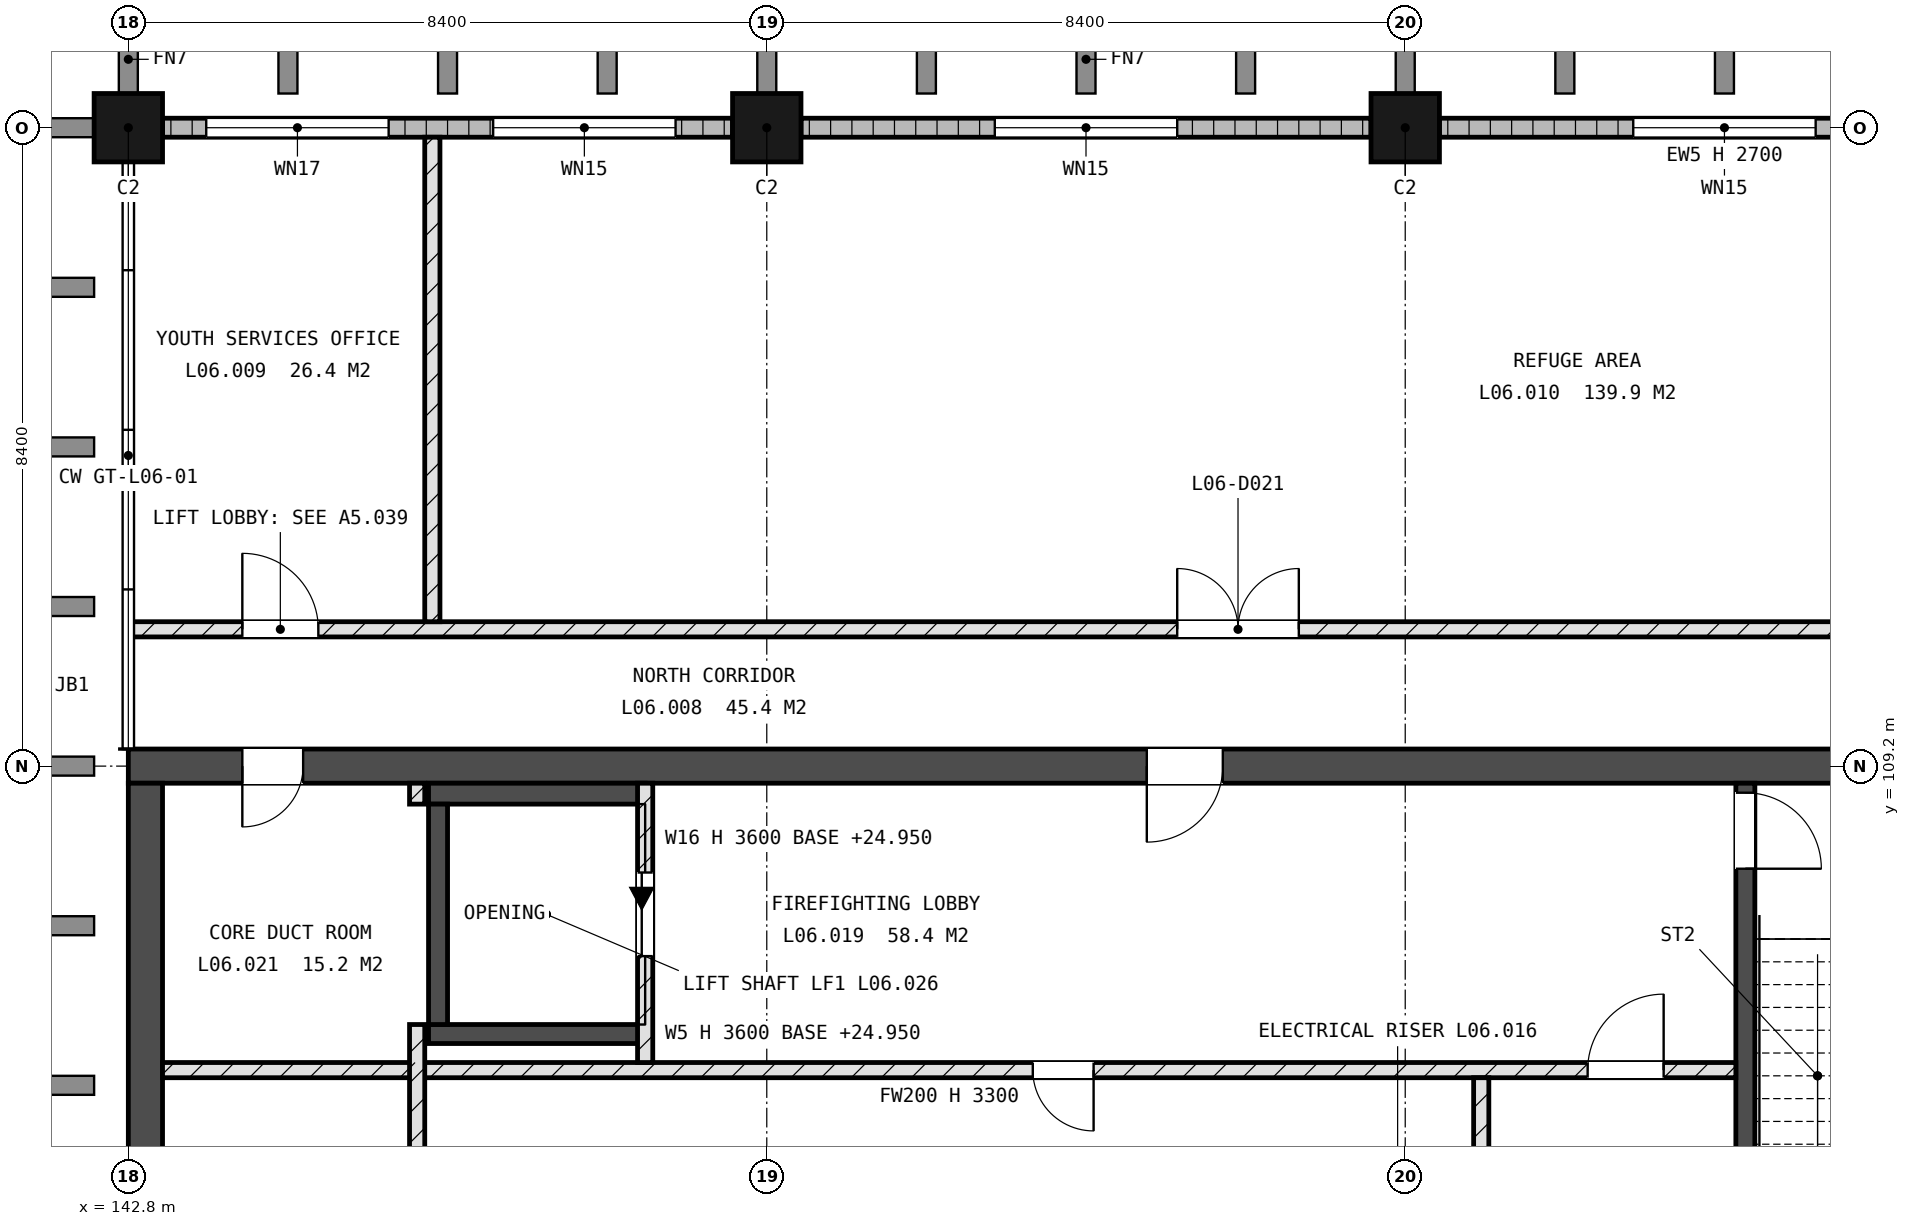
"""IFC4 building model, lengths in metres.
Left out: names, types, materials, properties, quantities, classifications, styles, units other than length and angle.
Written with IfcOpenShell. Run it as: python <this file> out.ifc"""

import sys

from ifc_helpers import new_model, si_unit, direction, frame, frame_2d, origin, origin_2d, place, context, subcontext, project, spatial, rectangle, extrude, element, fill, save


model = new_model("IFC4")
c1 = context("Model", 3, precision=1e-05, world=origin(), true_north=direction((0.0, 1.0)))
c2 = subcontext(c1, "Body", "Model", "MODEL_VIEW")
j1 = project(units=[si_unit("LENGTHUNIT", "METRE"), si_unit("PLANEANGLEUNIT", "RADIAN")], contexts=[c1])
p1 = place(None, origin())
s1 = spatial("IfcSite", under=j1, at=p1, CompositionType="ELEMENT")
p2 = place(p1, origin())
s2 = spatial("IfcBuilding", under=s1, at=p2, CompositionType="ELEMENT")
p3 = place(p2, frame((0.0, 0.0, 25.2)))
s3 = spatial("IfcBuildingStorey", under=s2, at=p3, CompositionType="ELEMENT", Elevation=25.2)
for number, where, z_axis, x_axis in (
    (1, (142.8, 117.6, -0.25), (0.0, 0.0, 1.0), (1.0, 0.0, 0.0)),
    (2, (151.2, 117.6, -0.25), (0.0, 0.0, 1.0), (1.0, 0.0, 0.0)),
    (3, (159.6, 117.6, -0.25), (0.0, 0.0, 1.0), (1.0, 0.0, 0.0)),
):
    element("IfcColumn", number, at=place(p3, frame(where, z_axis=z_axis, x_axis=x_axis)), inside=s3, PredefinedType="COLUMN", context=c2, shape_type="SweptSolid", body=[
        extrude(rectangle(XDim=0.9, YDim=0.9, at=origin_2d()), origin(), (0.0, 0.0, 1.0), 3.6),
    ])
p4 = place(p3, frame((142.8, 109.2, -0.25), z_axis=(0.0, 0.0, 1.0), x_axis=(1.0, 0.0, 0.0)))
e4 = element("IfcWall", 4, at=p4, inside=s3, PredefinedType="SHEAR", context=c2, shape_type="SweptSolid", body=[
    extrude(rectangle(XDim=25.2, YDim=0.45, at=frame_2d((12.6, 0.0))), origin(), (0.0, 0.0, 1.0), 3.6),
])
p5 = place(p4, frame((22.8, 0.0, 0.25)))
e5 = element("IfcOpeningElement", 5, at=p5, cuts=e4, PredefinedType="OPENING", context=c2, shape_type="SweptSolid", body=[
    extrude(rectangle(XDim=1.0, YDim=2.1, at=frame_2d((0.5, 1.05))), frame((0.0, 0.235, 0.0), z_axis=(0.0, -1.0, 0.0), x_axis=(1.0, 0.0, 0.0)), (0.0, 0.0, 1.0), 0.47),
])
p6 = place(p4, frame((1.5, 0.0, 0.25)))
e6 = element("IfcOpeningElement", 6, at=p6, cuts=e4, PredefinedType="OPENING", context=c2, shape_type="SweptSolid", body=[
    extrude(rectangle(XDim=0.8, YDim=2.1, at=frame_2d((0.4, 1.05))), frame((0.0, 0.235, 0.0), z_axis=(0.0, -1.0, 0.0), x_axis=(1.0, 0.0, 0.0)), (0.0, 0.0, 1.0), 0.47),
])
p7 = place(p4, frame((13.4, 0.0, 0.25)))
e7 = element("IfcOpeningElement", 7, at=p7, cuts=e4, PredefinedType="OPENING", context=c2, shape_type="SweptSolid", body=[
    extrude(rectangle(XDim=1.0, YDim=2.1, at=frame_2d((0.5, 1.05))), frame((0.0, 0.235, 0.0), z_axis=(0.0, -1.0, 0.0), x_axis=(1.0, 0.0, 0.0)), (0.0, 0.0, 1.0), 0.47),
])
p8 = place(p3, frame((143.025, 92.625, -0.25), z_axis=(0.0, 0.0, 1.0), x_axis=(0.0, 1.0, 0.0)))
e8 = element("IfcWall", 8, at=p8, inside=s3, PredefinedType="SHEAR", context=c2, shape_type="SweptSolid", body=[
    extrude(rectangle(XDim=16.35, YDim=0.45, at=frame_2d((8.175, 0.0))), origin(), (0.0, 0.0, 1.0), 3.6),
])
p9 = place(p8, frame((2.975, 0.0, 1.85)))
e9 = element("IfcOpeningElement", 9, at=p9, cuts=e8, PredefinedType="OPENING", context=c2, shape_type="SweptSolid", body=[
    extrude(rectangle(XDim=1.2, YDim=0.9, at=frame_2d((0.6, 0.45))), frame((0.0, 0.235, 0.0), z_axis=(0.0, -1.0, 0.0), x_axis=(1.0, 0.0, 0.0)), (0.0, 0.0, 1.0), 0.47),
])
p10 = place(p3, frame((164.075, 101.35, -0.25), z_axis=(0.0, 0.0, 1.0), x_axis=(0.0, 1.0, 0.0)))
e10 = element("IfcWall", 10, at=p10, inside=s3, PredefinedType="SHEAR", context=c2, shape_type="SweptSolid", body=[
    extrude(rectangle(XDim=7.625, YDim=0.25, at=frame_2d((3.812, 0.0))), origin(), (0.0, 0.0, 1.0), 3.6),
])
p11 = place(p10, frame((6.5, 0.0, 0.25)))
e11 = element("IfcOpeningElement", 11, at=p11, cuts=e10, PredefinedType="OPENING", context=c2, shape_type="SweptSolid", body=[
    extrude(rectangle(XDim=1.0, YDim=2.1, at=frame_2d((0.5, 1.05))), frame((0.0, 0.135, 0.0), z_axis=(0.0, -1.0, 0.0), x_axis=(1.0, 0.0, 0.0)), (0.0, 0.0, 1.0), 0.27),
])
p12 = place(p3, frame((146.75, 105.675, -0.25), z_axis=(0.0, 0.0, 1.0), x_axis=(1.0, 0.0, 0.0)))
e12 = element("IfcWall", 12, at=p12, inside=s3, PredefinedType="SHEAR", context=c2, shape_type="SweptSolid", body=[
    extrude(rectangle(XDim=2.85, YDim=0.25, at=frame_2d((1.425, 0.0))), origin(), (0.0, 0.0, 1.0), 3.6),
])
p13 = place(p3, frame((146.75, 108.837, -0.25), z_axis=(0.0, 0.0, 1.0), x_axis=(1.0, 0.0, 0.0)))
e13 = element("IfcWall", 13, at=p13, inside=s3, PredefinedType="SHEAR", context=c2, shape_type="SweptSolid", body=[
    extrude(rectangle(XDim=2.85, YDim=0.275, at=frame_2d((1.425, 0.0))), origin(), (0.0, 0.0, 1.0), 3.6),
])
p14 = place(p3, frame((146.875, 105.8, -0.25), z_axis=(0.0, 0.0, 1.0), x_axis=(0.0, 1.0, 0.0)))
e14 = element("IfcWall", 14, at=p14, inside=s3, PredefinedType="SHEAR", context=c2, shape_type="SweptSolid", body=[
    extrude(rectangle(XDim=2.9, YDim=0.25, at=frame_2d((1.45, 0.0))), origin(), (0.0, 0.0, 1.0), 3.6),
])
p15 = place(p3, frame((143.25, 117.6, 0.0), z_axis=(0.0, 0.0, 1.0), x_axis=(1.0, 0.0, 0.0)))
e15 = element("IfcWall", 15, at=p15, inside=s3, PredefinedType="STANDARD", context=c2, shape_type="SweptSolid", body=[
    extrude(rectangle(XDim=7.5, YDim=0.25, at=frame_2d((3.75, 0.0))), origin(), (0.0, 0.0, 1.0), 2.7),
])
p16 = place(p15, frame((0.575, 0.0, 0.9)))
e16 = element("IfcOpeningElement", 16, at=p16, cuts=e15, PredefinedType="OPENING", context=c2, shape_type="SweptSolid", body=[
    extrude(rectangle(XDim=2.4, YDim=1.5, at=frame_2d((1.2, 0.75))), frame((0.0, 0.135, 0.0), z_axis=(0.0, -1.0, 0.0), x_axis=(1.0, 0.0, 0.0)), (0.0, 0.0, 1.0), 0.27),
])
p17 = place(p15, frame((4.35, 0.0, 0.9)))
e17 = element("IfcOpeningElement", 17, at=p17, cuts=e15, PredefinedType="OPENING", context=c2, shape_type="SweptSolid", body=[
    extrude(rectangle(XDim=2.4, YDim=1.5, at=frame_2d((1.2, 0.75))), frame((0.0, 0.135, 0.0), z_axis=(0.0, -1.0, 0.0), x_axis=(1.0, 0.0, 0.0)), (0.0, 0.0, 1.0), 0.27),
])
p18 = place(p3, frame((151.65, 117.6, 0.0), z_axis=(0.0, 0.0, 1.0), x_axis=(1.0, 0.0, 0.0)))
e18 = element("IfcWall", 18, at=p18, inside=s3, PredefinedType="STANDARD", context=c2, shape_type="SweptSolid", body=[
    extrude(rectangle(XDim=7.5, YDim=0.25, at=frame_2d((3.75, 0.0))), origin(), (0.0, 0.0, 1.0), 2.7),
])
p19 = place(p18, frame((2.55, 0.0, 0.9)))
e19 = element("IfcOpeningElement", 19, at=p19, cuts=e18, PredefinedType="OPENING", context=c2, shape_type="SweptSolid", body=[
    extrude(rectangle(XDim=2.4, YDim=1.5, at=frame_2d((1.2, 0.75))), frame((0.0, 0.135, 0.0), z_axis=(0.0, -1.0, 0.0), x_axis=(1.0, 0.0, 0.0)), (0.0, 0.0, 1.0), 0.27),
])
p20 = place(p3, frame((160.05, 117.6, 0.0), z_axis=(0.0, 0.0, 1.0), x_axis=(1.0, 0.0, 0.0)))
e20 = element("IfcWall", 20, at=p20, inside=s3, PredefinedType="STANDARD", context=c2, shape_type="SweptSolid", body=[
    extrude(rectangle(XDim=7.5, YDim=0.25, at=frame_2d((3.75, 0.0))), origin(), (0.0, 0.0, 1.0), 2.7),
])
p21 = place(p20, frame((2.55, 0.0, 0.9)))
e21 = element("IfcOpeningElement", 21, at=p21, cuts=e20, PredefinedType="OPENING", context=c2, shape_type="SweptSolid", body=[
    extrude(rectangle(XDim=2.4, YDim=1.5, at=frame_2d((1.2, 0.75))), frame((0.0, 0.135, 0.0), z_axis=(0.0, -1.0, 0.0), x_axis=(1.0, 0.0, 0.0)), (0.0, 0.0, 1.0), 0.27),
])
p22 = place(p3, frame((143.25, 105.2, 0.0), z_axis=(0.0, 0.0, 1.0), x_axis=(1.0, 0.0, 0.0)))
e22 = element("IfcWall", 22, at=p22, inside=s3, PredefinedType="SOLIDWALL", context=c2, shape_type="SweptSolid", body=[
    extrude(rectangle(XDim=20.7, YDim=0.2, at=frame_2d((10.35, 0.0))), origin(), (0.0, 0.0, 1.0), 3.3),
])
p23 = place(p22, frame((11.45, 0.0, 0.0)))
e23 = element("IfcOpeningElement", 23, at=p23, cuts=e22, PredefinedType="OPENING", context=c2, shape_type="SweptSolid", body=[
    extrude(rectangle(XDim=0.8, YDim=2.1, at=frame_2d((0.4, 1.05))), frame((0.0, 0.11, 0.0), z_axis=(0.0, -1.0, 0.0), x_axis=(1.0, 0.0, 0.0)), (0.0, 0.0, 1.0), 0.22),
])
p24 = place(p22, frame((18.75, 0.0, 0.0)))
e24 = element("IfcOpeningElement", 24, at=p24, cuts=e22, PredefinedType="OPENING", context=c2, shape_type="SweptSolid", body=[
    extrude(rectangle(XDim=1.0, YDim=2.1, at=frame_2d((0.5, 1.05))), frame((0.0, 0.11, 0.0), z_axis=(0.0, -1.0, 0.0), x_axis=(1.0, 0.0, 0.0)), (0.0, 0.0, 1.0), 0.22),
])
p25 = place(p3, frame((142.8, 111.0, 0.0), z_axis=(0.0, 0.0, 1.0), x_axis=(1.0, 0.0, 0.0)))
e25 = element("IfcWall", 25, at=p25, inside=s3, PredefinedType="SOLIDWALL", context=c2, shape_type="SweptSolid", body=[
    extrude(rectangle(XDim=25.075, YDim=0.2, at=frame_2d((12.538, 0.0))), origin(), (0.0, 0.0, 1.0), 3.3),
])
p26 = place(p25, frame((1.5, 0.0, 0.0)))
e26 = element("IfcOpeningElement", 26, at=p26, cuts=e25, PredefinedType="OPENING", context=c2, shape_type="SweptSolid", body=[
    extrude(rectangle(XDim=1.0, YDim=2.1, at=frame_2d((0.5, 1.05))), frame((0.0, 0.11, 0.0), z_axis=(0.0, -1.0, 0.0), x_axis=(1.0, 0.0, 0.0)), (0.0, 0.0, 1.0), 0.22),
])
p27 = place(p25, frame((13.8, 0.0, 0.0)))
e27 = element("IfcOpeningElement", 27, at=p27, cuts=e25, PredefinedType="OPENING", context=c2, shape_type="SweptSolid", body=[
    extrude(rectangle(XDim=1.6, YDim=2.25, at=frame_2d((0.8, 1.125))), frame((0.0, 0.11, 0.0), z_axis=(0.0, -1.0, 0.0), x_axis=(1.0, 0.0, 0.0)), (0.0, 0.0, 1.0), 0.22),
])
p28 = place(p3, frame((146.6, 100.5, 0.0), z_axis=(0.0, 0.0, 1.0), x_axis=(0.0, 1.0, 0.0)))
e28 = element("IfcWall", 28, at=p28, inside=s3, PredefinedType="SOLIDWALL", context=c2, shape_type="SweptSolid", body=[
    extrude(rectangle(XDim=5.3, YDim=0.2, at=frame_2d((2.65, 0.0))), origin(), (0.0, 0.0, 1.0), 3.3),
])
p29 = place(p28, frame((1.8, 0.0, 0.0)))
e29 = element("IfcOpeningElement", 29, at=p29, cuts=e28, PredefinedType="OPENING", context=c2, shape_type="SweptSolid", body=[
    extrude(rectangle(XDim=1.0, YDim=2.1, at=frame_2d((0.5, 1.05))), frame((0.0, 0.11, 0.0), z_axis=(0.0, -1.0, 0.0), x_axis=(1.0, 0.0, 0.0)), (0.0, 0.0, 1.0), 0.22),
])
p30 = place(p3, frame((146.6, 108.7, 0.0), z_axis=(0.0, 0.0, 1.0), x_axis=(0.0, 1.0, 0.0)))
e30 = element("IfcWall", 30, at=p30, inside=s3, PredefinedType="SOLIDWALL", context=c2, shape_type="SweptSolid", body=[
    extrude(rectangle(XDim=0.275, YDim=0.2, at=frame_2d((0.138, 0.0))), origin(), (0.0, 0.0, 1.0), 3.3),
])
p31 = place(p3, frame((146.8, 111.1, 0.0), z_axis=(0.0, 0.0, 1.0), x_axis=(0.0, 1.0, 0.0)))
e31 = element("IfcWall", 31, at=p31, inside=s3, PredefinedType="SOLIDWALL", context=c2, shape_type="SweptSolid", body=[
    extrude(rectangle(XDim=6.375, YDim=0.2, at=frame_2d((3.188, 0.0))), origin(), (0.0, 0.0, 1.0), 3.3),
])
p32 = place(p3, frame((149.6, 105.3, 0.0), z_axis=(0.0, 0.0, 1.0), x_axis=(0.0, 1.0, 0.0)))
e32 = element("IfcWall", 32, at=p32, inside=s3, PredefinedType="SOLIDWALL", context=c2, shape_type="SweptSolid", body=[
    extrude(rectangle(XDim=3.675, YDim=0.2, at=frame_2d((1.837, 0.0))), origin(), (0.0, 0.0, 1.0), 3.3),
])
p33 = place(p32, frame((1.4, 0.0, 0.0)))
e33 = element("IfcOpeningElement", 33, at=p33, cuts=e32, PredefinedType="OPENING", context=c2, shape_type="SweptSolid", body=[
    extrude(rectangle(XDim=1.1, YDim=2.1, at=frame_2d((0.55, 1.05))), frame((0.0, 0.11, 0.0), z_axis=(0.0, -1.0, 0.0), x_axis=(1.0, 0.0, 0.0)), (0.0, 0.0, 1.0), 0.22),
])
p34 = place(p3, frame((160.6, 92.625, 0.0), z_axis=(0.0, 0.0, 1.0), x_axis=(0.0, 1.0, 0.0)))
e34 = element("IfcWall", 34, at=p34, inside=s3, PredefinedType="SOLIDWALL", context=c2, shape_type="SweptSolid", body=[
    extrude(rectangle(XDim=12.475, YDim=0.2, at=frame_2d((6.238, 0.0))), origin(), (0.0, 0.0, 1.0), 3.3),
])
p35 = place(p34, frame((5.075, 0.0, 0.0)))
e35 = element("IfcOpeningElement", 35, at=p35, cuts=e34, PredefinedType="OPENING", context=c2, shape_type="SweptSolid", body=[
    extrude(rectangle(XDim=0.8, YDim=2.1, at=frame_2d((0.4, 1.05))), frame((0.0, 0.11, 0.0), z_axis=(0.0, -1.0, 0.0), x_axis=(1.0, 0.0, 0.0)), (0.0, 0.0, 1.0), 0.22),
])
p36 = place(p34, frame((0.775, 0.0, 0.0)))
e36 = element("IfcOpeningElement", 36, at=p36, cuts=e34, PredefinedType="OPENING", context=c2, shape_type="SweptSolid", body=[
    extrude(rectangle(XDim=1.0, YDim=2.1, at=frame_2d((0.5, 1.05))), frame((0.0, 0.11, 0.0), z_axis=(0.0, -1.0, 0.0), x_axis=(1.0, 0.0, 0.0)), (0.0, 0.0, 1.0), 0.22),
])
p37 = place(p16, origin())
e37 = element("IfcWindow", 37, at=p37, inside=s3, PartitioningType="SINGLE_PANEL", PredefinedType="WINDOW", context=c2, shape_type="SweptSolid", body=[
    extrude(rectangle(XDim=2.4, YDim=1.5, at=frame_2d((1.2, 0.75))), frame((0.0, 0.03, 0.0), z_axis=(0.0, -1.0, 0.0), x_axis=(1.0, 0.0, 0.0)), (0.0, 0.0, 1.0), 0.06),
])
fill(e16, e37)
p38 = place(p17, origin())
e38 = element("IfcWindow", 38, at=p38, inside=s3, PartitioningType="SINGLE_PANEL", PredefinedType="WINDOW", context=c2, shape_type="SweptSolid", body=[
    extrude(rectangle(XDim=2.4, YDim=1.5, at=frame_2d((1.2, 0.75))), frame((0.0, 0.03, 0.0), z_axis=(0.0, -1.0, 0.0), x_axis=(1.0, 0.0, 0.0)), (0.0, 0.0, 1.0), 0.06),
])
fill(e17, e38)
p39 = place(p19, origin())
e39 = element("IfcWindow", 39, at=p39, inside=s3, PartitioningType="SINGLE_PANEL", PredefinedType="WINDOW", context=c2, shape_type="SweptSolid", body=[
    extrude(rectangle(XDim=2.4, YDim=1.5, at=frame_2d((1.2, 0.75))), frame((0.0, 0.03, 0.0), z_axis=(0.0, -1.0, 0.0), x_axis=(1.0, 0.0, 0.0)), (0.0, 0.0, 1.0), 0.06),
])
fill(e19, e39)
p40 = place(p21, origin())
e40 = element("IfcWindow", 40, at=p40, inside=s3, PartitioningType="SINGLE_PANEL", PredefinedType="WINDOW", context=c2, shape_type="SweptSolid", body=[
    extrude(rectangle(XDim=2.4, YDim=1.5, at=frame_2d((1.2, 0.75))), frame((0.0, 0.03, 0.0), z_axis=(0.0, -1.0, 0.0), x_axis=(1.0, 0.0, 0.0)), (0.0, 0.0, 1.0), 0.06),
])
fill(e21, e40)
p41 = place(p33, origin())
e41 = element("IfcDoor", 41, at=p41, inside=s3, OperationType="SLIDING_TO_LEFT", PredefinedType="DOOR", context=c2, shape_type="SweptSolid", body=[
    extrude(rectangle(XDim=1.1, YDim=2.1, at=frame_2d((0.55, 1.05))), frame((0.0, 0.025, 0.0), z_axis=(0.0, -1.0, 0.0), x_axis=(1.0, 0.0, 0.0)), (0.0, 0.0, 1.0), 0.05),
])
fill(e33, e41)
p42 = place(p11, origin())
e42 = element("IfcDoor", 42, at=p42, inside=s3, OperationType="SINGLE_SWING_LEFT", PredefinedType="DOOR", context=c2, shape_type="SweptSolid", body=[
    extrude(rectangle(XDim=1.0, YDim=2.1, at=frame_2d((0.5, 1.05))), frame((0.0, 0.025, 0.0), z_axis=(0.0, -1.0, 0.0), x_axis=(1.0, 0.0, 0.0)), (0.0, 0.0, 1.0), 0.05),
])
fill(e11, e42)
p43 = place(p26, origin())
e43 = element("IfcDoor", 43, at=p43, inside=s3, OperationType="SINGLE_SWING_RIGHT", PredefinedType="DOOR", context=c2, shape_type="SweptSolid", body=[
    extrude(rectangle(XDim=1.0, YDim=2.1, at=frame_2d((0.5, 1.05))), frame((0.0, 0.025, 0.0), z_axis=(0.0, -1.0, 0.0), x_axis=(1.0, 0.0, 0.0)), (0.0, 0.0, 1.0), 0.05),
])
fill(e26, e43)
p44 = place(p27, origin())
e44 = element("IfcDoor", 44, at=p44, inside=s3, OperationType="DOUBLE_DOOR_SINGLE_SWING", PredefinedType="DOOR", context=c2, shape_type="SweptSolid", body=[
    extrude(rectangle(XDim=1.6, YDim=2.25, at=frame_2d((0.8, 1.125))), frame((0.0, 0.025, 0.0), z_axis=(0.0, -1.0, 0.0), x_axis=(1.0, 0.0, 0.0)), (0.0, 0.0, 1.0), 0.05),
])
fill(e27, e44)
p45 = place(p23, origin())
e45 = element("IfcDoor", 45, at=p45, inside=s3, OperationType="SINGLE_SWING_RIGHT", PredefinedType="DOOR", context=c2, shape_type="SweptSolid", body=[
    extrude(rectangle(XDim=0.8, YDim=2.1, at=frame_2d((0.4, 1.05))), frame((0.0, 0.025, 0.0), z_axis=(0.0, -1.0, 0.0), x_axis=(1.0, 0.0, 0.0)), (0.0, 0.0, 1.0), 0.05),
])
fill(e23, e45)
p46 = place(p6, origin())
e46 = element("IfcDoor", 46, at=p46, inside=s3, OperationType="SINGLE_SWING_LEFT", PredefinedType="DOOR", context=c2, shape_type="SweptSolid", body=[
    extrude(rectangle(XDim=0.8, YDim=2.1, at=frame_2d((0.4, 1.05))), frame((0.0, 0.025, 0.0), z_axis=(0.0, -1.0, 0.0), x_axis=(1.0, 0.0, 0.0)), (0.0, 0.0, 1.0), 0.05),
])
fill(e6, e46)
p47 = place(p7, origin())
e47 = element("IfcDoor", 47, at=p47, inside=s3, OperationType="SINGLE_SWING_LEFT", PredefinedType="DOOR", context=c2, shape_type="SweptSolid", body=[
    extrude(rectangle(XDim=1.0, YDim=2.1, at=frame_2d((0.5, 1.05))), frame((0.0, 0.025, 0.0), z_axis=(0.0, -1.0, 0.0), x_axis=(1.0, 0.0, 0.0)), (0.0, 0.0, 1.0), 0.05),
])
fill(e7, e47)
p48 = place(p24, origin())
e48 = element("IfcDoor", 48, at=p48, inside=s3, OperationType="SINGLE_SWING_LEFT", PredefinedType="DOOR", context=c2, shape_type="SweptSolid", body=[
    extrude(rectangle(XDim=1.0, YDim=2.1, at=frame_2d((0.5, 1.05))), frame((0.0, 0.025, 0.0), z_axis=(0.0, -1.0, 0.0), x_axis=(1.0, 0.0, 0.0)), (0.0, 0.0, 1.0), 0.05),
])
fill(e24, e48)
save(model, sys.argv[1])
